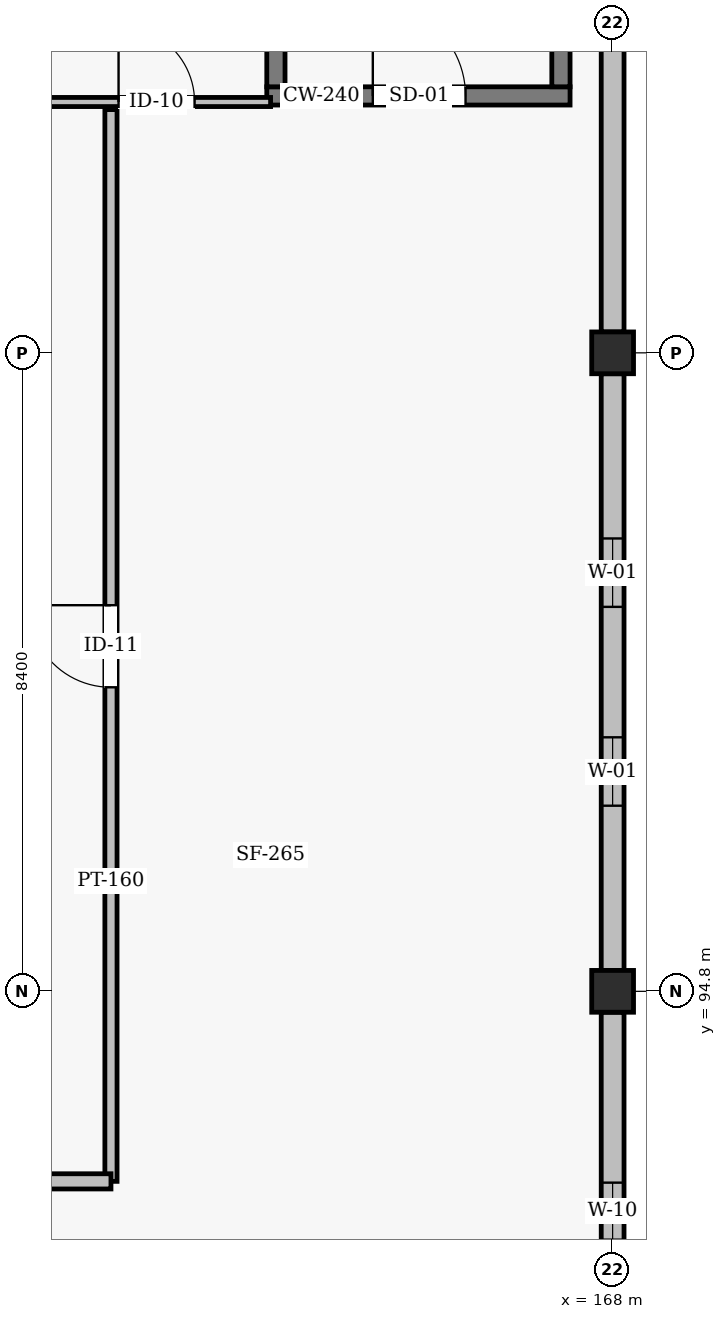
"""IFC4 building model, lengths in metres.
Left out: names, types, materials, properties, quantities, classifications, styles, units other than length and angle.
Written with IfcOpenShell. Run it as: python <this file> out.ifc"""

import sys

from ifc_helpers import new_model, si_unit, direction, frame, frame_2d, origin, origin_2d, place, context, subcontext, project, spatial, rectangle, hollow_rectangle, extrude, element, fill, save


model = new_model("IFC4")
c1 = context("Model", 3, precision=1e-05, world=origin(), true_north=direction((0.0, 1.0)))
c2 = subcontext(c1, "Body", "Model", "MODEL_VIEW")
j1 = project(units=[si_unit("LENGTHUNIT", "METRE"), si_unit("PLANEANGLEUNIT", "RADIAN")], contexts=[c1])
p1 = place(None, origin())
s1 = spatial("IfcSite", under=j1, at=p1, CompositionType="ELEMENT")
p2 = place(p1, origin())
s2 = spatial("IfcBuilding", under=s1, at=p2, CompositionType="ELEMENT")
p3 = place(p2, frame((0.0, 0.0, 13.2)))
s3 = spatial("IfcBuildingStorey", under=s2, at=p3, CompositionType="ELEMENT", Elevation=13.2)
for number, where, z_axis, x_axis in (
    (1, (168.0, 94.8, 0.0), (0.0, 0.0, 1.0), (1.0, 0.0, 0.0)),
    (2, (168.0, 103.2, 0.0), (0.0, 0.0, 1.0), (1.0, 0.0, 0.0)),
):
    element("IfcColumn", number, at=place(p3, frame(where, z_axis=z_axis, x_axis=x_axis)), inside=s3, PredefinedType="COLUMN", context=c2, shape_type="SweptSolid", body=[
        extrude(hollow_rectangle(XDim=0.55, YDim=0.55, WallThickness=0.022, InnerFilletRadius=0.022, OuterFilletRadius=0.044, at=origin_2d()), origin(), (0.0, 0.0, 1.0), 3.9),
    ])
p4 = place(p3, frame((168.0, 86.675, 0.0), z_axis=(0.0, 0.0, 1.0), x_axis=(0.0, 1.0, 0.0)))
e3 = element("IfcWall", 3, at=p4, inside=s3, PredefinedType="SOLIDWALL", context=c2, shape_type="SweptSolid", body=[
    extrude(rectangle(XDim=7.85, YDim=0.3, at=frame_2d((3.925, 0.0))), origin(), (0.0, 0.0, 1.0), 3.12),
])
p5 = place(p4, frame((2.242, 0.0, 1.05)))
e4 = element("IfcOpeningElement", 4, at=p5, cuts=e3, PredefinedType="OPENING", context=c2, shape_type="SweptSolid", body=[
    extrude(rectangle(XDim=0.75, YDim=1.6, at=frame_2d((0.375, 0.8))), frame((0.0, 0.16, 0.0), z_axis=(0.0, -1.0, 0.0), x_axis=(1.0, 0.0, 0.0)), (0.0, 0.0, 1.0), 0.32),
])
p6 = place(p4, frame((4.858, 0.0, 1.05)))
e5 = element("IfcOpeningElement", 5, at=p6, cuts=e3, PredefinedType="OPENING", context=c2, shape_type="SweptSolid", body=[
    extrude(rectangle(XDim=0.75, YDim=1.6, at=frame_2d((0.375, 0.8))), frame((0.0, 0.16, 0.0), z_axis=(0.0, -1.0, 0.0), x_axis=(1.0, 0.0, 0.0)), (0.0, 0.0, 1.0), 0.32),
])
p7 = place(p3, frame((168.0, 95.075, 0.0), z_axis=(0.0, 0.0, 1.0), x_axis=(0.0, 1.0, 0.0)))
e6 = element("IfcWall", 6, at=p7, inside=s3, PredefinedType="SOLIDWALL", context=c2, shape_type="SweptSolid", body=[
    extrude(rectangle(XDim=7.85, YDim=0.3, at=frame_2d((3.925, 0.0))), origin(), (0.0, 0.0, 1.0), 3.12),
])
p8 = place(p7, frame((2.167, 0.0, 0.95)))
e7 = element("IfcOpeningElement", 7, at=p8, cuts=e6, PredefinedType="OPENING", context=c2, shape_type="SweptSolid", body=[
    extrude(rectangle(XDim=0.9, YDim=1.8, at=frame_2d((0.45, 0.9))), frame((0.0, 0.16, 0.0), z_axis=(0.0, -1.0, 0.0), x_axis=(1.0, 0.0, 0.0)), (0.0, 0.0, 1.0), 0.32),
])
p9 = place(p7, frame((4.783, 0.0, 0.95)))
e8 = element("IfcOpeningElement", 8, at=p9, cuts=e6, PredefinedType="OPENING", context=c2, shape_type="SweptSolid", body=[
    extrude(rectangle(XDim=0.9, YDim=1.8, at=frame_2d((0.45, 0.9))), frame((0.0, 0.16, 0.0), z_axis=(0.0, -1.0, 0.0), x_axis=(1.0, 0.0, 0.0)), (0.0, 0.0, 1.0), 0.32),
])
p10 = place(p3, frame((168.0, 103.475, 0.0), z_axis=(0.0, 0.0, 1.0), x_axis=(0.0, 1.0, 0.0)))
e9 = element("IfcWall", 9, at=p10, inside=s3, PredefinedType="SOLIDWALL", context=c2, shape_type="SweptSolid", body=[
    extrude(rectangle(XDim=11.45, YDim=0.3, at=frame_2d((5.725, 0.0))), origin(), (0.0, 0.0, 1.0), 2.828),
])
p11 = place(p3, frame((163.45, 106.58, 0.0), z_axis=(0.0, 0.0, 1.0), x_axis=(1.0, 0.0, 0.0)))
e10 = element("IfcWall", 10, at=p11, inside=s3, PredefinedType="SHEAR", context=c2, shape_type="SweptSolid", body=[
    extrude(rectangle(XDim=3.99, YDim=0.24, at=frame_2d((1.995, 0.0))), origin(), (0.0, 0.0, 1.0), 3.62),
])
p12 = place(p11, frame((1.395, 0.0, 0.0)))
e11 = element("IfcOpeningElement", 11, at=p12, cuts=e10, PredefinedType="OPENING", context=c2, shape_type="SweptSolid", body=[
    extrude(rectangle(XDim=1.22, YDim=2.18, at=frame_2d((0.61, 1.09))), frame((0.0, 0.13, 0.0), z_axis=(0.0, -1.0, 0.0), x_axis=(1.0, 0.0, 0.0)), (0.0, 0.0, 1.0), 0.26),
])
for number, where, z_axis, x_axis in (
    (12, (163.57, 106.7, 0.0), (0.0, 0.0, 1.0), (0.0, 1.0, 0.0)),
    (13, (167.32, 106.7, 0.0), (0.0, 0.0, 1.0), (0.0, 1.0, 0.0)),
):
    element("IfcWall", number, at=place(p3, frame(where, z_axis=z_axis, x_axis=x_axis)), inside=s3, PredefinedType="SHEAR", context=c2, shape_type="SweptSolid", body=[
        extrude(rectangle(XDim=7.9, YDim=0.24, at=frame_2d((3.95, 0.0))), origin(), (0.0, 0.0, 1.0), 3.62),
    ])
p13 = place(p3, frame((160.5, 106.5, 0.0), z_axis=(0.0, 0.0, 1.0), x_axis=(1.0, 0.0, 0.0)))
e14 = element("IfcWall", 14, at=p13, inside=s3, PredefinedType="PARTITIONING", context=c2, shape_type="SweptSolid", body=[
    extrude(rectangle(XDim=3.0, YDim=0.12, at=frame_2d((1.5, 0.0))), origin(), (0.0, 0.0, 1.0), 3.62),
])
p14 = place(p13, frame((1.0, 0.0, 0.0)))
e15 = element("IfcOpeningElement", 15, at=p14, cuts=e14, PredefinedType="OPENING", context=c2, shape_type="SweptSolid", body=[
    extrude(rectangle(XDim=1.0, YDim=2.1, at=frame_2d((0.5, 1.05))), frame((0.0, 0.07, 0.0), z_axis=(0.0, -1.0, 0.0), x_axis=(1.0, 0.0, 0.0)), (0.0, 0.0, 1.0), 0.14),
])
p15 = place(p3, frame((161.4, 92.3, 0.0), z_axis=(0.0, 0.0, 1.0), x_axis=(0.0, 1.0, 0.0)))
e16 = element("IfcWall", 16, at=p15, inside=s3, PredefinedType="PARTITIONING", context=c2, shape_type="SweptSolid", body=[
    extrude(rectangle(XDim=14.1, YDim=0.16, at=frame_2d((7.05, 0.0))), origin(), (0.0, 0.0, 1.0), 2.97),
])
p16 = place(p15, frame((6.5, 0.0, 0.0)))
e17 = element("IfcOpeningElement", 17, at=p16, cuts=e16, PredefinedType="OPENING", context=c2, shape_type="SweptSolid", body=[
    extrude(rectangle(XDim=1.08, YDim=2.08, at=frame_2d((0.54, 1.04))), frame((0.0, 0.09, 0.0), z_axis=(0.0, -1.0, 0.0), x_axis=(1.0, 0.0, 0.0)), (0.0, 0.0, 1.0), 0.18),
])
p17 = place(p3, frame((145.1, 92.3, 0.0), z_axis=(0.0, 0.0, 1.0), x_axis=(1.0, 0.0, 0.0)))
e18 = element("IfcWall", 18, at=p17, inside=s3, PredefinedType="SOLIDWALL", context=c2, shape_type="SweptSolid", body=[
    extrude(rectangle(XDim=16.3, YDim=0.2, at=frame_2d((8.15, 0.0))), origin(), (0.0, 0.0, 1.0), 3.23),
])
p18 = place(p17, frame((7.45, 0.0, 0.0)))
e19 = element("IfcOpeningElement", 19, at=p18, cuts=e18, PredefinedType="OPENING", context=c2, shape_type="SweptSolid", body=[
    extrude(rectangle(XDim=1.42, YDim=2.18, at=frame_2d((0.71, 1.09))), frame((0.0, 0.11, 0.0), z_axis=(0.0, -1.0, 0.0), x_axis=(1.0, 0.0, 0.0)), (0.0, 0.0, 1.0), 0.22),
])
p19 = place(p6, origin())
e20 = element("IfcWindow", 20, at=p19, inside=s3, PartitioningType="SINGLE_PANEL", PredefinedType="WINDOW", context=c2, shape_type="SweptSolid", body=[
    extrude(rectangle(XDim=0.75, YDim=1.6, at=frame_2d((0.375, 0.8))), frame((0.0, 0.03, 0.0), z_axis=(0.0, -1.0, 0.0), x_axis=(1.0, 0.0, 0.0)), (0.0, 0.0, 1.0), 0.06),
])
fill(e5, e20)
p20 = place(p8, origin())
e21 = element("IfcWindow", 21, at=p20, inside=s3, PartitioningType="SINGLE_PANEL", PredefinedType="WINDOW", context=c2, shape_type="SweptSolid", body=[
    extrude(rectangle(XDim=0.9, YDim=1.8, at=frame_2d((0.45, 0.9))), frame((0.0, 0.03, 0.0), z_axis=(0.0, -1.0, 0.0), x_axis=(1.0, 0.0, 0.0)), (0.0, 0.0, 1.0), 0.06),
])
fill(e7, e21)
p21 = place(p9, origin())
e22 = element("IfcWindow", 22, at=p21, inside=s3, PartitioningType="SINGLE_PANEL", PredefinedType="WINDOW", context=c2, shape_type="SweptSolid", body=[
    extrude(rectangle(XDim=0.9, YDim=1.8, at=frame_2d((0.45, 0.9))), frame((0.0, 0.03, 0.0), z_axis=(0.0, -1.0, 0.0), x_axis=(1.0, 0.0, 0.0)), (0.0, 0.0, 1.0), 0.06),
])
fill(e8, e22)
p22 = place(p12, origin())
e23 = element("IfcDoor", 23, at=p22, inside=s3, OperationType="SINGLE_SWING_LEFT", PredefinedType="DOOR", context=c2, shape_type="SweptSolid", body=[
    extrude(rectangle(XDim=1.22, YDim=2.18, at=frame_2d((0.61, 1.09))), frame((0.0, 0.025, 0.0), z_axis=(0.0, -1.0, 0.0), x_axis=(1.0, 0.0, 0.0)), (0.0, 0.0, 1.0), 0.05),
])
fill(e11, e23)
p23 = place(p14, origin())
e24 = element("IfcDoor", 24, at=p23, inside=s3, OperationType="SINGLE_SWING_LEFT", PredefinedType="DOOR", context=c2, shape_type="SweptSolid", body=[
    extrude(rectangle(XDim=1.0, YDim=2.1, at=frame_2d((0.5, 1.05))), frame((0.0, 0.025, 0.0), z_axis=(0.0, -1.0, 0.0), x_axis=(1.0, 0.0, 0.0)), (0.0, 0.0, 1.0), 0.05),
])
fill(e15, e24)
p24 = place(p16, origin())
e25 = element("IfcDoor", 25, at=p24, inside=s3, OperationType="SINGLE_SWING_RIGHT", PredefinedType="DOOR", context=c2, shape_type="SweptSolid", body=[
    extrude(rectangle(XDim=1.08, YDim=2.08, at=frame_2d((0.54, 1.04))), frame((0.0, 0.025, 0.0), z_axis=(0.0, -1.0, 0.0), x_axis=(1.0, 0.0, 0.0)), (0.0, 0.0, 1.0), 0.05),
])
fill(e17, e25)
save(model, sys.argv[1])
